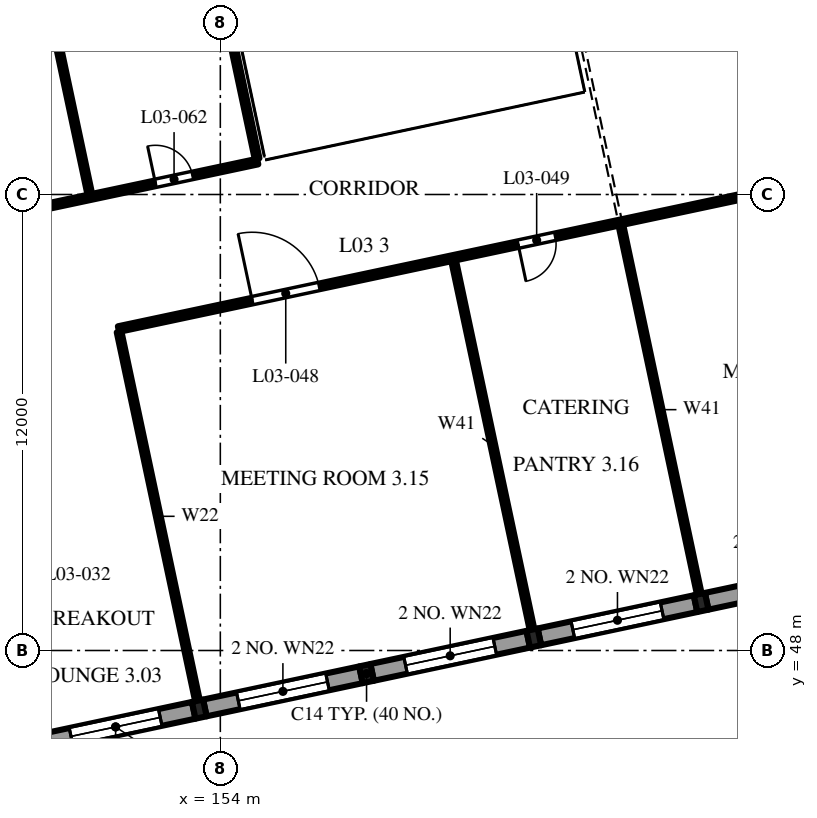
"""IFC4 building model, lengths in metres.
Left out: names, types, materials, properties, quantities, classifications, styles, units other than length and angle.
Written with IfcOpenShell. Run it as: python <this file> out.ifc"""

import sys

from ifc_helpers import new_model, si_unit, direction, frame, frame_2d, origin, origin_2d, place, context, subcontext, project, spatial, polyline, rectangle, i_section, outline, extrude, element, fill, save


model = new_model("IFC4")
c1 = context("Model", 3, precision=1e-05, world=origin(), true_north=direction((0.0, 1.0)))
c2 = subcontext(c1, "Body", "Model", "MODEL_VIEW")
j1 = project(units=[si_unit("LENGTHUNIT", "METRE"), si_unit("PLANEANGLEUNIT", "RADIAN")], contexts=[c1])
p1 = place(None, origin())
s1 = spatial("IfcSite", under=j1, at=p1, CompositionType="ELEMENT")
p2 = place(p1, origin())
s2 = spatial("IfcBuilding", under=s1, at=p2, CompositionType="ELEMENT")
p3 = place(p2, frame((0.0, 0.0, 16.8)))
s3 = spatial("IfcBuildingStorey", under=s2, at=p3, CompositionType="ELEMENT", Elevation=16.8)
for number, where, z_axis, x_axis in (
    (1, (153.446, 46.457, 0.0), (0.0, 0.0, 1.0), (0.978, 0.208, 0.0)),
    (2, (157.848, 47.393, 0.0), (0.0, 0.0, 1.0), (0.978, 0.208, 0.0)),
    (3, (162.249, 48.328, 0.0), (0.0, 0.0, 1.0), (0.978, 0.208, 0.0)),
    (4, (166.651, 49.264, 0.0), (0.0, 0.0, 1.0), (0.978, 0.208, 0.0)),
):
    element("IfcColumn", number, at=place(p3, frame(where, z_axis=z_axis, x_axis=x_axis)), inside=s3, PredefinedType="COLUMN", context=c2, shape_type="SweptSolid", body=[
        extrude(i_section(OverallWidth=0.3, OverallDepth=0.45, WebThickness=0.014, FlangeThickness=0.026, FilletRadius=0.027, at=origin_2d()), origin(), (0.0, 0.0, 1.0), 4.8),
    ])
p4 = place(p3, frame((166.876, 70.091, 0.0), z_axis=(0.0, 0.0, 1.0), x_axis=(0.207915693476, -0.978146749934, 0.0)))
e5 = element("IfcWall", 5, at=p4, inside=s3, PredefinedType="SOLIDWALL", context=c2, shape_type="SweptSolid", body=[
    extrude(outline(polyline([(0.0, 0.0), (8.0, 0.0), (8.0, 12.196), (0.0, 11.777), (0.0, 0.0)])), frame((0.0, 0.175, 0.0), z_axis=(0.0, -1.0, 0.0), x_axis=(1.0, 0.0, 0.0)), (0.0, 0.0, 1.0), 0.35),
])
p5 = place(p4, frame((0.3, 0.0, 0.0)))
e6 = element("IfcOpeningElement", 6, at=p5, cuts=e5, PredefinedType="OPENING", context=c2, shape_type="SweptSolid", body=[
    extrude(rectangle(XDim=1.2, YDim=2.1, at=frame_2d((0.6, 1.05))), frame((0.0, 0.185, 0.0), z_axis=(0.0, -1.0, 0.0), x_axis=(1.0, 0.0, 0.0)), (0.0, 0.0, 1.0), 0.37),
])
p6 = place(p3, frame((149.191, 45.552, 0.0), z_axis=(0.0, 0.0, 1.0), x_axis=(0.978146440129, 0.207917150959, 0.0)))
e7 = element("IfcWall", 7, at=p6, inside=s3, PredefinedType="SOLIDWALL", context=c2, shape_type="SweptSolid", body=[
    extrude(outline(polyline([(0.0, 0.0), (4.2, 0.0), (4.2, 13.168), (0.0, 12.943), (0.0, 0.0)])), frame((0.0, 0.225, 0.0), z_axis=(0.0, -1.0, 0.0), x_axis=(1.0, 0.0, 0.0)), (0.0, 0.0, 1.0), 0.45),
])
p7 = place(p6, frame((0.9, 0.0, 0.45)))
e8 = element("IfcOpeningElement", 8, at=p7, cuts=e7, PredefinedType="OPENING", context=c2, shape_type="SweptSolid", body=[
    extrude(rectangle(XDim=2.4, YDim=3.3, at=frame_2d((1.2, 1.65))), frame((0.0, 0.235, 0.0), z_axis=(0.0, -1.0, 0.0), x_axis=(1.0, 0.0, 0.0)), (0.0, 0.0, 1.0), 0.47),
])
p8 = place(p6, frame((0.9, 0.0, 5.1)))
e9 = element("IfcOpeningElement", 9, at=p8, cuts=e7, PredefinedType="OPENING", context=c2, shape_type="SweptSolid", body=[
    extrude(rectangle(XDim=2.4, YDim=2.4, at=frame_2d((1.2, 1.2))), frame((0.0, 0.235, 0.0), z_axis=(0.0, -1.0, 0.0), x_axis=(1.0, 0.0, 0.0)), (0.0, 0.0, 1.0), 0.47),
])
p9 = place(p3, frame((153.593, 46.488, 0.0), z_axis=(0.0, 0.0, 1.0), x_axis=(0.978143927149, 0.207928972925, 0.0)))
e10 = element("IfcWall", 10, at=p9, inside=s3, PredefinedType="SOLIDWALL", context=c2, shape_type="SweptSolid", body=[
    extrude(outline(polyline([(0.0, 0.0), (4.2, 0.0), (4.2, 13.409), (0.0, 13.184), (0.0, 0.0)])), frame((0.0, 0.225, 0.0), z_axis=(0.0, -1.0, 0.0), x_axis=(1.0, 0.0, 0.0)), (0.0, 0.0, 1.0), 0.45),
])
p10 = place(p9, frame((0.9, 0.0, 0.9)))
e11 = element("IfcOpeningElement", 11, at=p10, cuts=e10, PredefinedType="OPENING", context=c2, shape_type="SweptSolid", body=[
    extrude(rectangle(XDim=2.4, YDim=2.4, at=frame_2d((1.2, 1.2))), frame((0.0, 0.235, 0.0), z_axis=(0.0, -1.0, 0.0), x_axis=(1.0, 0.0, 0.0)), (0.0, 0.0, 1.0), 0.47),
])
p11 = place(p9, frame((0.9, 0.0, 5.1)))
e12 = element("IfcOpeningElement", 12, at=p11, cuts=e10, PredefinedType="OPENING", context=c2, shape_type="SweptSolid", body=[
    extrude(rectangle(XDim=2.4, YDim=2.4, at=frame_2d((1.2, 1.2))), frame((0.0, 0.235, 0.0), z_axis=(0.0, -1.0, 0.0), x_axis=(1.0, 0.0, 0.0)), (0.0, 0.0, 1.0), 0.47),
])
p12 = place(p3, frame((157.994, 47.424, 0.0), z_axis=(0.0, 0.0, 1.0), x_axis=(0.978143927149, 0.207928972925, 0.0)))
e13 = element("IfcWall", 13, at=p12, inside=s3, PredefinedType="SOLIDWALL", context=c2, shape_type="SweptSolid", body=[
    extrude(outline(polyline([(0.0, 0.0), (4.2, 0.0), (4.2, 13.65), (0.0, 13.425), (0.0, 0.0)])), frame((0.0, 0.225, 0.0), z_axis=(0.0, -1.0, 0.0), x_axis=(1.0, 0.0, 0.0)), (0.0, 0.0, 1.0), 0.45),
])
p13 = place(p12, frame((0.9, 0.0, 0.9)))
e14 = element("IfcOpeningElement", 14, at=p13, cuts=e13, PredefinedType="OPENING", context=c2, shape_type="SweptSolid", body=[
    extrude(rectangle(XDim=2.4, YDim=2.4, at=frame_2d((1.2, 1.2))), frame((0.0, 0.235, 0.0), z_axis=(0.0, -1.0, 0.0), x_axis=(1.0, 0.0, 0.0)), (0.0, 0.0, 1.0), 0.47),
])
p14 = place(p12, frame((0.9, 0.0, 5.1)))
e15 = element("IfcOpeningElement", 15, at=p14, cuts=e13, PredefinedType="OPENING", context=c2, shape_type="SweptSolid", body=[
    extrude(rectangle(XDim=2.4, YDim=2.4, at=frame_2d((1.2, 1.2))), frame((0.0, 0.235, 0.0), z_axis=(0.0, -1.0, 0.0), x_axis=(1.0, 0.0, 0.0)), (0.0, 0.0, 1.0), 0.47),
])
p15 = place(p3, frame((162.396, 48.359, 0.0), z_axis=(0.0, 0.0, 1.0), x_axis=(0.978155748334, 0.207873355681, 0.0)))
e16 = element("IfcWall", 16, at=p15, inside=s3, PredefinedType="SOLIDWALL", context=c2, shape_type="SweptSolid", body=[
    extrude(outline(polyline([(0.0, 0.0), (4.2, 0.0), (4.2, 13.89), (0.0, 13.666), (0.0, 0.0)])), frame((0.0, 0.225, 0.0), z_axis=(0.0, -1.0, 0.0), x_axis=(1.0, 0.0, 0.0)), (0.0, 0.0, 1.0), 0.45),
])
p16 = place(p15, frame((0.9, 0.0, 0.9)))
e17 = element("IfcOpeningElement", 17, at=p16, cuts=e16, PredefinedType="OPENING", context=c2, shape_type="SweptSolid", body=[
    extrude(rectangle(XDim=2.4, YDim=2.4, at=frame_2d((1.2, 1.2))), frame((0.0, 0.235, 0.0), z_axis=(0.0, -1.0, 0.0), x_axis=(1.0, 0.0, 0.0)), (0.0, 0.0, 1.0), 0.47),
])
p17 = place(p15, frame((0.9, 0.0, 5.1)))
e18 = element("IfcOpeningElement", 18, at=p17, cuts=e16, PredefinedType="OPENING", context=c2, shape_type="SweptSolid", body=[
    extrude(rectangle(XDim=2.4, YDim=2.4, at=frame_2d((1.2, 1.2))), frame((0.0, 0.235, 0.0), z_axis=(0.0, -1.0, 0.0), x_axis=(1.0, 0.0, 0.0)), (0.0, 0.0, 1.0), 0.47),
])
p18 = place(p3, frame((166.798, 49.295, 0.0), z_axis=(0.0, 0.0, 1.0), x_axis=(0.978143927149, 0.207928972925, 0.0)))
e19 = element("IfcWall", 19, at=p18, inside=s3, PredefinedType="SOLIDWALL", context=c2, shape_type="SweptSolid", body=[
    extrude(outline(polyline([(0.0, 0.0), (4.2, 0.0), (4.2, 14.131), (0.0, 13.906), (0.0, 0.0)])), frame((0.0, 0.225, 0.0), z_axis=(0.0, -1.0, 0.0), x_axis=(1.0, 0.0, 0.0)), (0.0, 0.0, 1.0), 0.45),
])
p19 = place(p18, frame((0.9, 0.0, 0.9)))
e20 = element("IfcOpeningElement", 20, at=p19, cuts=e19, PredefinedType="OPENING", context=c2, shape_type="SweptSolid", body=[
    extrude(rectangle(XDim=2.4, YDim=2.4, at=frame_2d((1.2, 1.2))), frame((0.0, 0.235, 0.0), z_axis=(0.0, -1.0, 0.0), x_axis=(1.0, 0.0, 0.0)), (0.0, 0.0, 1.0), 0.47),
])
p20 = place(p18, frame((0.9, 0.0, 5.1)))
e21 = element("IfcOpeningElement", 21, at=p20, cuts=e19, PredefinedType="OPENING", context=c2, shape_type="SweptSolid", body=[
    extrude(rectangle(XDim=2.4, YDim=2.4, at=frame_2d((1.2, 1.2))), frame((0.0, 0.235, 0.0), z_axis=(0.0, -1.0, 0.0), x_axis=(1.0, 0.0, 0.0)), (0.0, 0.0, 1.0), 0.47),
])
p21 = place(p3, frame((151.32, 56.458, 0.0), z_axis=(0.0, 0.0, 1.0), x_axis=(0.97814787394, 0.207910405482, 0.0)))
e22 = element("IfcWall", 22, at=p21, inside=s3, PredefinedType="PARTITIONING", context=c2, shape_type="SweptSolid", body=[
    extrude(outline(polyline([(0.0, 0.0), (45.0, 0.0), (45.0, 12.948), (0.0, 10.54), (0.0, 0.0)])), frame((0.0, 0.075, 0.0), z_axis=(0.0, -1.0, 0.0), x_axis=(1.0, 0.0, 0.0)), (0.0, 0.0, 1.0), 0.15),
])
p22 = place(p21, frame((3.6, 0.0, 0.0)))
e23 = element("IfcOpeningElement", 23, at=p22, cuts=e22, PredefinedType="OPENING", context=c2, shape_type="SweptSolid", body=[
    extrude(rectangle(XDim=1.8, YDim=2.1, at=frame_2d((0.9, 1.05))), frame((0.0, 0.085, 0.0), z_axis=(0.0, -1.0, 0.0), x_axis=(1.0, 0.0, 0.0)), (0.0, 0.0, 1.0), 0.17),
])
p23 = place(p21, frame((10.75, 0.0, 0.0)))
e24 = element("IfcOpeningElement", 24, at=p23, cuts=e22, PredefinedType="OPENING", context=c2, shape_type="SweptSolid", body=[
    extrude(rectangle(XDim=1.0, YDim=2.1, at=frame_2d((0.5, 1.05))), frame((0.0, 0.085, 0.0), z_axis=(0.0, -1.0, 0.0), x_axis=(1.0, 0.0, 0.0)), (0.0, 0.0, 1.0), 0.17),
])
p24 = place(p21, frame((17.1, 0.0, 0.0)))
e25 = element("IfcOpeningElement", 25, at=p24, cuts=e22, PredefinedType="OPENING", context=c2, shape_type="SweptSolid", body=[
    extrude(rectangle(XDim=1.8, YDim=2.1, at=frame_2d((0.9, 1.05))), frame((0.0, 0.085, 0.0), z_axis=(0.0, -1.0, 0.0), x_axis=(1.0, 0.0, 0.0)), (0.0, 0.0, 1.0), 0.17),
])
p25 = place(p21, frame((24.25, 0.0, 0.0)))
e26 = element("IfcOpeningElement", 26, at=p25, cuts=e22, PredefinedType="OPENING", context=c2, shape_type="SweptSolid", body=[
    extrude(rectangle(XDim=1.0, YDim=2.1, at=frame_2d((0.5, 1.05))), frame((0.0, 0.085, 0.0), z_axis=(0.0, -1.0, 0.0), x_axis=(1.0, 0.0, 0.0)), (0.0, 0.0, 1.0), 0.17),
])
p26 = place(p21, frame((30.75, 0.0, 0.0)))
e27 = element("IfcOpeningElement", 27, at=p26, cuts=e22, PredefinedType="OPENING", context=c2, shape_type="SweptSolid", body=[
    extrude(rectangle(XDim=1.5, YDim=2.1, at=frame_2d((0.75, 1.05))), frame((0.0, 0.085, 0.0), z_axis=(0.0, -1.0, 0.0), x_axis=(1.0, 0.0, 0.0)), (0.0, 0.0, 1.0), 0.17),
])
p27 = place(p21, frame((39.6, 0.0, 0.0)))
e28 = element("IfcOpeningElement", 28, at=p27, cuts=e22, PredefinedType="OPENING", context=c2, shape_type="SweptSolid", body=[
    extrude(rectangle(XDim=1.8, YDim=2.1, at=frame_2d((0.9, 1.05))), frame((0.0, 0.085, 0.0), z_axis=(0.0, -1.0, 0.0), x_axis=(1.0, 0.0, 0.0)), (0.0, 0.0, 1.0), 0.17),
])
p28 = place(p3, frame((153.399, 46.677, 0.0), z_axis=(0.0, 0.0, 1.0), x_axis=(-0.20790935802, 0.978148096582, 0.0)))
e29 = element("IfcWall", 29, at=p28, inside=s3, PredefinedType="PARTITIONING", context=c2, shape_type="SweptSolid", body=[
    extrude(outline(polyline([(0.0, 0.0), (9.925, 0.0), (9.925, 9.825), (0.0, 9.825), (0.0, 0.0)])), frame((0.0, 0.062, 0.0), z_axis=(0.0, -1.0, 0.0), x_axis=(1.0, 0.0, 0.0)), (0.0, 0.0, 1.0), 0.125),
])
p29 = place(p3, frame((162.202, 48.548, 0.0), z_axis=(0.0, 0.0, 1.0), x_axis=(-0.207904355568, 0.978149159861, 0.0)))
e30 = element("IfcWall", 30, at=p29, inside=s3, PredefinedType="PARTITIONING", context=c2, shape_type="SweptSolid", body=[
    extrude(outline(polyline([(0.0, 0.0), (9.925, 0.0), (9.925, 10.307), (0.0, 10.307), (0.0, 0.0)])), frame((0.0, 0.062, 0.0), z_axis=(0.0, -1.0, 0.0), x_axis=(1.0, 0.0, 0.0)), (0.0, 0.0, 1.0), 0.125),
])
p30 = place(p3, frame((166.604, 49.484, 0.0), z_axis=(0.0, 0.0, 1.0), x_axis=(-0.207932893358, 0.978143093754, 0.0)))
e31 = element("IfcWall", 31, at=p30, inside=s3, PredefinedType="PARTITIONING", context=c2, shape_type="SweptSolid", body=[
    extrude(outline(polyline([(0.0, 0.0), (9.925, 0.0), (9.925, 10.548), (0.0, 10.548), (0.0, 0.0)])), frame((0.0, 0.062, 0.0), z_axis=(0.0, -1.0, 0.0), x_axis=(1.0, 0.0, 0.0)), (0.0, 0.0, 1.0), 0.125),
])
p31 = place(p3, frame((115.369, 52.446, 0.0), z_axis=(0.0, 0.0, 1.0), x_axis=(0.978147680869, 0.207911313813, 0.0)))
e32 = element("IfcWall", 32, at=p31, inside=s3, PredefinedType="PARTITIONING", context=c2, shape_type="SweptSolid", body=[
    extrude(outline(polyline([(0.0, 0.0), (40.5, 0.0), (40.5, 10.595), (0.0, 8.428), (0.0, 0.0)])), frame((0.0, 0.075, 0.0), z_axis=(0.0, -1.0, 0.0), x_axis=(1.0, 0.0, 0.0)), (0.0, 0.0, 1.0), 0.15),
])
p32 = place(p31, frame((5.85, 0.0, 0.0)))
e33 = element("IfcOpeningElement", 33, at=p32, cuts=e32, PredefinedType="OPENING", context=c2, shape_type="SweptSolid", body=[
    extrude(rectangle(XDim=1.8, YDim=2.1, at=frame_2d((0.9, 1.05))), frame((0.0, 0.085, 0.0), z_axis=(0.0, -1.0, 0.0), x_axis=(1.0, 0.0, 0.0)), (0.0, 0.0, 1.0), 0.17),
])
p33 = place(p31, frame((17.1, 0.0, 0.0)))
e34 = element("IfcOpeningElement", 34, at=p33, cuts=e32, PredefinedType="OPENING", context=c2, shape_type="SweptSolid", body=[
    extrude(rectangle(XDim=1.8, YDim=2.1, at=frame_2d((0.9, 1.05))), frame((0.0, 0.085, 0.0), z_axis=(0.0, -1.0, 0.0), x_axis=(1.0, 0.0, 0.0)), (0.0, 0.0, 1.0), 0.17),
])
p34 = place(p31, frame((28.35, 0.0, 0.0)))
e35 = element("IfcOpeningElement", 35, at=p34, cuts=e32, PredefinedType="OPENING", context=c2, shape_type="SweptSolid", body=[
    extrude(rectangle(XDim=1.8, YDim=2.1, at=frame_2d((0.9, 1.05))), frame((0.0, 0.085, 0.0), z_axis=(0.0, -1.0, 0.0), x_axis=(1.0, 0.0, 0.0)), (0.0, 0.0, 1.0), 0.17),
])
p35 = place(p31, frame((37.75, 0.0, 0.0)))
e36 = element("IfcOpeningElement", 36, at=p35, cuts=e32, PredefinedType="OPENING", context=c2, shape_type="SweptSolid", body=[
    extrude(rectangle(XDim=1.0, YDim=2.1, at=frame_2d((0.5, 1.05))), frame((0.0, 0.085, 0.0), z_axis=(0.0, -1.0, 0.0), x_axis=(1.0, 0.0, 0.0)), (0.0, 0.0, 1.0), 0.17),
])
p36 = place(p3, frame((148.503, 69.712, 0.0), z_axis=(0.0, 0.0, 1.0), x_axis=(0.207904355568, -0.978149159861, 0.0)))
e37 = element("IfcWall", 37, at=p36, inside=s3, PredefinedType="PARTITIONING", context=c2, shape_type="SweptSolid", body=[
    extrude(outline(polyline([(0.0, 0.0), (9.925, 0.0), (9.925, 9.825), (0.0, 9.825), (0.0, 0.0)])), frame((0.0, 0.062, 0.0), z_axis=(0.0, -1.0, 0.0), x_axis=(1.0, 0.0, 0.0)), (0.0, 0.0, 1.0), 0.125),
])
p37 = place(p3, frame((152.905, 70.648, 0.0), z_axis=(0.0, 0.0, 1.0), x_axis=(0.20790935802, -0.978148096582, 0.0)))
e38 = element("IfcWall", 38, at=p37, inside=s3, PredefinedType="PARTITIONING", context=c2, shape_type="SweptSolid", body=[
    extrude(outline(polyline([(0.0, 0.0), (9.925, 0.0), (9.925, 10.066), (0.0, 10.066), (0.0, 0.0)])), frame((0.0, 0.062, 0.0), z_axis=(0.0, -1.0, 0.0), x_axis=(1.0, 0.0, 0.0)), (0.0, 0.0, 1.0), 0.125),
])
p38 = place(p7, origin())
e39 = element("IfcWindow", 39, at=p38, inside=s3, PartitioningType="DOUBLE_PANEL_VERTICAL", PredefinedType="WINDOW", context=c2, shape_type="SweptSolid", body=[
    extrude(rectangle(XDim=2.4, YDim=3.3, at=frame_2d((1.2, 1.65))), frame((0.0, 0.03, 0.0), z_axis=(0.0, -1.0, 0.0), x_axis=(1.0, 0.0, 0.0)), (0.0, 0.0, 1.0), 0.06),
])
fill(e8, e39)
p39 = place(p8, origin())
e40 = element("IfcWindow", 40, at=p39, inside=s3, PartitioningType="SINGLE_PANEL", PredefinedType="WINDOW", context=c2, shape_type="SweptSolid", body=[
    extrude(rectangle(XDim=2.4, YDim=2.4, at=frame_2d((1.2, 1.2))), frame((0.0, 0.03, 0.0), z_axis=(0.0, -1.0, 0.0), x_axis=(1.0, 0.0, 0.0)), (0.0, 0.0, 1.0), 0.06),
])
fill(e9, e40)
p40 = place(p10, origin())
e41 = element("IfcWindow", 41, at=p40, inside=s3, PartitioningType="SINGLE_PANEL", PredefinedType="WINDOW", context=c2, shape_type="SweptSolid", body=[
    extrude(rectangle(XDim=2.4, YDim=2.4, at=frame_2d((1.2, 1.2))), frame((0.0, 0.03, 0.0), z_axis=(0.0, -1.0, 0.0), x_axis=(1.0, 0.0, 0.0)), (0.0, 0.0, 1.0), 0.06),
])
fill(e11, e41)
p41 = place(p11, origin())
e42 = element("IfcWindow", 42, at=p41, inside=s3, PartitioningType="SINGLE_PANEL", PredefinedType="WINDOW", context=c2, shape_type="SweptSolid", body=[
    extrude(rectangle(XDim=2.4, YDim=2.4, at=frame_2d((1.2, 1.2))), frame((0.0, 0.03, 0.0), z_axis=(0.0, -1.0, 0.0), x_axis=(1.0, 0.0, 0.0)), (0.0, 0.0, 1.0), 0.06),
])
fill(e12, e42)
p42 = place(p13, origin())
e43 = element("IfcWindow", 43, at=p42, inside=s3, PartitioningType="SINGLE_PANEL", PredefinedType="WINDOW", context=c2, shape_type="SweptSolid", body=[
    extrude(rectangle(XDim=2.4, YDim=2.4, at=frame_2d((1.2, 1.2))), frame((0.0, 0.03, 0.0), z_axis=(0.0, -1.0, 0.0), x_axis=(1.0, 0.0, 0.0)), (0.0, 0.0, 1.0), 0.06),
])
fill(e14, e43)
p43 = place(p14, origin())
e44 = element("IfcWindow", 44, at=p43, inside=s3, PartitioningType="SINGLE_PANEL", PredefinedType="WINDOW", context=c2, shape_type="SweptSolid", body=[
    extrude(rectangle(XDim=2.4, YDim=2.4, at=frame_2d((1.2, 1.2))), frame((0.0, 0.03, 0.0), z_axis=(0.0, -1.0, 0.0), x_axis=(1.0, 0.0, 0.0)), (0.0, 0.0, 1.0), 0.06),
])
fill(e15, e44)
p44 = place(p16, origin())
e45 = element("IfcWindow", 45, at=p44, inside=s3, PartitioningType="SINGLE_PANEL", PredefinedType="WINDOW", context=c2, shape_type="SweptSolid", body=[
    extrude(rectangle(XDim=2.4, YDim=2.4, at=frame_2d((1.2, 1.2))), frame((0.0, 0.03, 0.0), z_axis=(0.0, -1.0, 0.0), x_axis=(1.0, 0.0, 0.0)), (0.0, 0.0, 1.0), 0.06),
])
fill(e17, e45)
p45 = place(p17, origin())
e46 = element("IfcWindow", 46, at=p45, inside=s3, PartitioningType="SINGLE_PANEL", PredefinedType="WINDOW", context=c2, shape_type="SweptSolid", body=[
    extrude(rectangle(XDim=2.4, YDim=2.4, at=frame_2d((1.2, 1.2))), frame((0.0, 0.03, 0.0), z_axis=(0.0, -1.0, 0.0), x_axis=(1.0, 0.0, 0.0)), (0.0, 0.0, 1.0), 0.06),
])
fill(e18, e46)
p46 = place(p22, origin())
e47 = element("IfcDoor", 47, at=p46, inside=s3, OperationType="DOUBLE_DOOR_SINGLE_SWING", PredefinedType="DOOR", context=c2, shape_type="SweptSolid", body=[
    extrude(rectangle(XDim=1.8, YDim=2.1, at=frame_2d((0.9, 1.05))), frame((0.0, 0.025, 0.0), z_axis=(0.0, -1.0, 0.0), x_axis=(1.0, 0.0, 0.0)), (0.0, 0.0, 1.0), 0.05),
])
fill(e23, e47)
p47 = place(p23, frame((1.0, 0.0, 0.0), z_axis=(0.0, 0.0, 1.0), x_axis=(-1.0, 0.0, 0.0)))
e48 = element("IfcDoor", 48, at=p47, inside=s3, OperationType="SINGLE_SWING_LEFT", PredefinedType="DOOR", context=c2, shape_type="SweptSolid", body=[
    extrude(rectangle(XDim=1.0, YDim=2.1, at=frame_2d((0.5, 1.05))), frame((0.0, 0.025, 0.0), z_axis=(0.0, -1.0, 0.0), x_axis=(1.0, 0.0, 0.0)), (0.0, 0.0, 1.0), 0.05),
])
fill(e24, e48)
p48 = place(p35, origin())
e49 = element("IfcDoor", 49, at=p48, inside=s3, OperationType="SINGLE_SWING_RIGHT", PredefinedType="DOOR", context=c2, shape_type="SweptSolid", body=[
    extrude(rectangle(XDim=1.0, YDim=2.1, at=frame_2d((0.5, 1.05))), frame((0.0, 0.025, 0.0), z_axis=(0.0, -1.0, 0.0), x_axis=(1.0, 0.0, 0.0)), (0.0, 0.0, 1.0), 0.05),
])
fill(e36, e49)
save(model, sys.argv[1])
